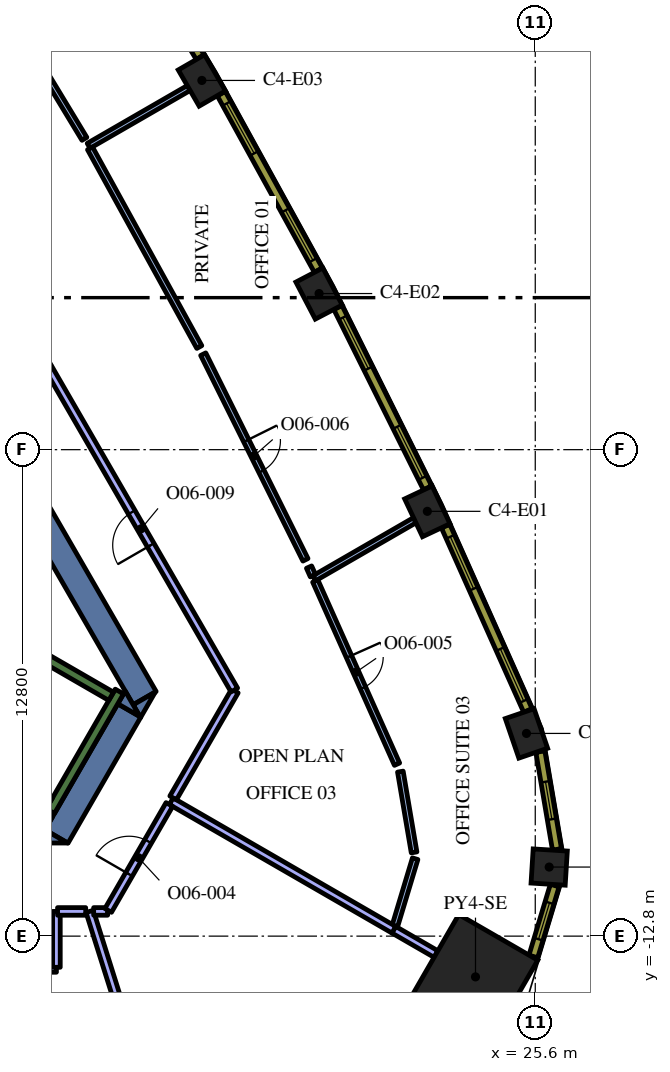
"""IFC4 building model, lengths in metres.
Left out: names, types, materials, properties, quantities, classifications, styles, units other than length and angle.
Written with IfcOpenShell. Run it as: python <this file> out.ifc"""

import sys

from ifc_helpers import new_model, si_unit, direction, frame, frame_2d, origin, origin_2d, place, context, subcontext, project, spatial, polyline, rectangle, outline, extrude, element, fill, save


model = new_model("IFC4")
c1 = context("Model", 3, precision=1e-05, world=origin(), true_north=direction((0.0, 1.0)))
c2 = subcontext(c1, "Body", "Model", "MODEL_VIEW")
j1 = project(units=[si_unit("LENGTHUNIT", "METRE"), si_unit("PLANEANGLEUNIT", "RADIAN")], contexts=[c1])
p1 = place(None, origin())
s1 = spatial("IfcSite", under=j1, at=p1, CompositionType="ELEMENT")
p2 = place(p1, origin())
s2 = spatial("IfcBuilding", under=s1, at=p2, CompositionType="ELEMENT")
p3 = place(p2, frame((0.0, 0.0, 205.8)))
s3 = spatial("IfcBuildingStorey", under=s2, at=p3, CompositionType="ELEMENT", Elevation=205.8)
p4 = place(p3, frame((24.027, -13.872, 0.0), z_axis=(0.0, 0.0, 1.0), x_axis=(0.866025403784, -0.5, 0.0)))
e1 = element("IfcColumn", 1, at=p4, inside=s3, PredefinedType="COLUMN", context=c2, shape_type="SweptSolid", body=[
    extrude(rectangle(XDim=2.4, YDim=2.4, at=origin_2d()), origin(), (0.0, 0.0, 1.0), 4.2),
])
p5 = place(p3, frame((25.967, -10.982, 0.0), z_axis=(0.0, 0.0, 1.0), x_axis=(0.062217428964, 0.998062619044, 0.0)))
e2 = element("IfcColumn", 2, at=p5, inside=s3, PredefinedType="COLUMN", context=c2, shape_type="SweptSolid", body=[
    extrude(rectangle(XDim=0.9, YDim=0.9, at=origin_2d()), origin(), (0.0, 0.0, 1.0), 4.2),
])
for number, where, z_axis, x_axis in (
    (3, (25.369, -7.466, 0.0), (0.0, 0.0, 1.0), (-0.324, 0.946, 0.0)),
    (4, (22.76, -1.623, 0.0), (0.0, 0.0, 1.0), (-0.426, 0.905, 0.0)),
    (5, (19.912, 4.108, 0.0), (0.0, 0.0, 1.0), (-0.464, 0.886, 0.0)),
    (6, (16.827, 9.715, 0.0), (0.0, 0.0, 1.0), (-0.5, 0.866, 0.0)),
):
    element("IfcColumn", number, at=place(p3, frame(where, z_axis=z_axis, x_axis=x_axis)), inside=s3, PredefinedType="COLUMN", context=c2, shape_type="SweptSolid", body=[
        extrude(rectangle(XDim=1.1, YDim=0.8, at=origin_2d()), origin(), (0.0, 0.0, 1.0), 4.2),
    ])
p6 = place(p3, frame((9.085, 4.264, 0.0), z_axis=(0.0, 0.0, 1.0), x_axis=(0.499998082512, -0.866026510844, 0.0)))
e7 = element("IfcWall", 7, at=p6, inside=s3, PredefinedType="SOLIDWALL", context=c2, shape_type="SweptSolid", body=[
    extrude(rectangle(XDim=12.472, YDim=0.7, at=frame_2d((6.236, 0.0))), origin(), (0.0, 0.0, 1.0), 4.2),
])
p7 = place(p3, origin())
e8 = element("IfcWall", 8, at=p7, inside=s3, PredefinedType="SOLIDWALL", context=c2, shape_type="SweptSolid", body=[
    extrude(outline(polyline([(15.213, -7.05), (15.019, -6.714), (15.601, -6.378), (15.213, -7.05)])), origin(), (0.0, 0.0, 1.0), 4.2),
])
p8 = place(p3, frame((13.003, -10.179, 0.0), z_axis=(0.0, 0.0, 1.0), x_axis=(0.499972675833, 0.866041178825, 0.0)))
e9 = element("IfcWall", 9, at=p8, inside=s3, PredefinedType="SOLIDWALL", context=c2, shape_type="SweptSolid", body=[
    extrude(rectangle(XDim=3.829, YDim=0.7, at=frame_2d((1.915, 0.0))), origin(), (0.0, 0.0, 1.0), 4.2),
])
e10 = element("IfcWall", 10, at=p7, inside=s3, PredefinedType="SOLIDWALL", context=c2, shape_type="SweptSolid", body=[
    extrude(outline(polyline([(12.698, -10.005), (13.296, -10.35), (12.5, -10.35), (12.698, -10.005)])), origin(), (0.0, 0.0, 1.0), 4.2),
])
e11 = element("IfcWall", 11, at=p7, inside=s3, PredefinedType="SOLIDWALL", context=c2, shape_type="SweptSolid", body=[
    extrude(outline(polyline([(14.809, -6.35), (15.197, -7.022), (14.615, -6.686), (14.809, -6.35)])), origin(), (0.0, 0.0, 1.0), 4.2),
])
e12 = element("IfcWall", 12, at=p7, inside=s3, PredefinedType="SOLIDWALL", context=c2, shape_type="SweptSolid", body=[
    extrude(outline(polyline([(12.904, -9.65), (12.516, -10.322), (12.516, -9.65), (12.904, -9.65)])), origin(), (0.0, 0.0, 1.0), 4.2),
])
p9 = place(p3, frame((12.84, -9.511, 0.0), z_axis=(0.0, 0.0, 1.0), x_axis=(0.500048121057, 0.865997619297, 0.0)))
e13 = element("IfcWall", 13, at=p9, inside=s3, PredefinedType="SOLIDWALL", context=c2, shape_type="SweptSolid", body=[
    extrude(rectangle(XDim=3.634, YDim=0.25, at=frame_2d((1.817, 0.0))), origin(), (0.0, 0.0, 1.0), 4.2),
])
p10 = place(p3, frame((12.84, -9.261, 0.0), z_axis=(0.0, 0.0, 1.0), x_axis=(-0.866013990052, 0.500019768644, 0.0)))
e14 = element("IfcWall", 14, at=p10, inside=s3, PredefinedType="SOLIDWALL", context=c2, shape_type="SweptSolid", body=[
    extrude(rectangle(XDim=6.8, YDim=0.25, at=frame_2d((3.4, 0.0))), origin(), (0.0, 0.0, 1.0), 4.2),
])
p11 = place(p3, frame((8.334, -2.964, 0.0), z_axis=(0.0, 0.0, 1.0), x_axis=(0.866016039709, -0.500016218704, 0.0)))
e15 = element("IfcWall", 15, at=p11, inside=s3, PredefinedType="SOLIDWALL", context=c2, shape_type="SweptSolid", body=[
    extrude(rectangle(XDim=7.05, YDim=0.25, at=frame_2d((3.525, 0.0))), origin(), (0.0, 0.0, 1.0), 4.2),
])
p12 = place(p3, frame((13.875, -12.15, 0.0), z_axis=(0.0, 0.0, 1.0), x_axis=(0.3005606746, -0.953762696316, 0.0)))
e16 = element("IfcWall", 16, at=p12, inside=s3, PredefinedType="PARTITIONING", context=c2, shape_type="SweptSolid", body=[
    extrude(rectangle(XDim=6.9, YDim=0.2, at=frame_2d((3.45, 0.0))), origin(), (0.0, 0.0, 1.0), 3.45),
])
p13 = place(p3, frame((6.517, -13.65, 0.0), z_axis=(0.0, 0.0, 1.0), x_axis=(1.0, 0.0, 0.0)))
e17 = element("IfcWall", 17, at=p13, inside=s3, PredefinedType="PARTITIONING", context=c2, shape_type="SweptSolid", body=[
    extrude(rectangle(XDim=6.483, YDim=0.2, at=frame_2d((3.242, 0.0))), origin(), (0.0, 0.0, 1.0), 3.45),
])
p14 = place(p13, frame((2.7, 0.0, 0.0)))
e18 = element("IfcOpeningElement", 18, at=p14, cuts=e17, PredefinedType="OPENING", context=c2, shape_type="SweptSolid", body=[
    extrude(rectangle(XDim=1.0, YDim=2.1, at=frame_2d((0.5, 1.05))), frame((0.0, 0.11, 0.0), z_axis=(0.0, -1.0, 0.0), x_axis=(1.0, 0.0, 0.0)), (0.0, 0.0, 1.0), 0.22),
])
p15 = place(p3, frame((13.0, -13.62, 0.0), z_axis=(0.0, 0.0, 1.0), x_axis=(0.0, 1.0, 0.0)))
e19 = element("IfcWall", 19, at=p15, inside=s3, PredefinedType="PARTITIONING", context=c2, shape_type="SweptSolid", body=[
    extrude(rectangle(XDim=1.47, YDim=0.2, at=frame_2d((0.735, 0.0))), origin(), (0.0, 0.0, 1.0), 3.45),
])
p16 = place(p3, frame((13.03, -12.15, 0.0), z_axis=(0.0, 0.0, 1.0), x_axis=(1.0, 0.0, 0.0)))
e20 = element("IfcWall", 20, at=p16, inside=s3, PredefinedType="PARTITIONING", context=c2, shape_type="SweptSolid", body=[
    extrude(rectangle(XDim=0.74, YDim=0.2, at=frame_2d((0.37, 0.0))), origin(), (0.0, 0.0, 1.0), 3.45),
])
p17 = place(p3, frame((21.873, -12.628, 0.0), z_axis=(0.0, 0.0, 1.0), x_axis=(0.866052988967, -0.499952218018, 0.0)))
e21 = element("IfcWall", 21, at=p17, inside=s3, PredefinedType="PARTITIONING", context=c2, shape_type="SweptSolid", body=[
    extrude(rectangle(XDim=1.288, YDim=0.2, at=frame_2d((0.644, 0.0))), origin(), (0.0, 0.0, 1.0), 3.45),
])
p18 = place(p3, frame((16.021, -9.25, 0.0), z_axis=(0.0, 0.0, 1.0), x_axis=(0.86602692059, -0.499997372806, 0.0)))
e22 = element("IfcWall", 22, at=p18, inside=s3, PredefinedType="PARTITIONING", context=c2, shape_type="SweptSolid", body=[
    extrude(rectangle(XDim=6.765, YDim=0.2, at=frame_2d((3.382, 0.0))), origin(), (0.0, 0.0, 1.0), 3.45),
])
p19 = place(p3, frame((13.98, -12.15, 0.0), z_axis=(0.0, 0.0, 1.0), x_axis=(1.0, 0.0, 0.0)))
e23 = element("IfcWall", 23, at=p19, inside=s3, PredefinedType="PARTITIONING", context=c2, shape_type="SweptSolid", body=[
    extrude(rectangle(XDim=0.367, YDim=0.2, at=frame_2d((0.184, 0.0))), origin(), (0.0, 0.0, 1.0), 3.45),
])
p20 = place(p3, frame((14.362, -12.124, 0.0), z_axis=(0.0, 0.0, 1.0), x_axis=(0.500022299258, 0.866012528919, 0.0)))
e24 = element("IfcWall", 24, at=p20, inside=s3, PredefinedType="PARTITIONING", context=c2, shape_type="SweptSolid", body=[
    extrude(rectangle(XDim=3.219, YDim=0.2, at=frame_2d((1.609, 0.0))), origin(), (0.0, 0.0, 1.0), 3.45),
])
p21 = place(p20, frame((1.1, 0.0, 0.0)))
e25 = element("IfcOpeningElement", 25, at=p21, cuts=e24, PredefinedType="OPENING", context=c2, shape_type="SweptSolid", body=[
    extrude(rectangle(XDim=1.0, YDim=2.1, at=frame_2d((0.5, 1.05))), frame((0.0, 0.11, 0.0), z_axis=(0.0, -1.0, 0.0), x_axis=(1.0, 0.0, 0.0)), (0.0, 0.0, 1.0), 0.22),
])
p22 = place(p3, frame((19.78, -3.386, 0.0), z_axis=(0.0, 0.0, 1.0), x_axis=(0.866063280451, 0.49993438995, 0.0)))
e26 = element("IfcWall", 26, at=p22, inside=s3, PredefinedType="PARTITIONING", context=c2, shape_type="SweptSolid", body=[
    extrude(rectangle(XDim=3.058, YDim=0.15, at=frame_2d((1.529, 0.0))), origin(), (0.0, 0.0, 1.0), 3.45),
])
p23 = place(p3, frame((21.906, -12.532, 0.0), z_axis=(0.0, 0.0, 1.0), x_axis=(0.288789848591, 0.957392512688, 0.0)))
e27 = element("IfcWall", 27, at=p23, inside=s3, PredefinedType="PARTITIONING", context=c2, shape_type="SweptSolid", body=[
    extrude(rectangle(XDim=1.848, YDim=0.15, at=frame_2d((0.924, 0.0))), origin(), (0.0, 0.0, 1.0), 3.45),
])
p24 = place(p3, frame((22.412, -10.597, 0.0), z_axis=(0.0, 0.0, 1.0), x_axis=(-0.167612004459, 0.985853039738, 0.0)))
e28 = element("IfcWall", 28, at=p24, inside=s3, PredefinedType="PARTITIONING", context=c2, shape_type="SweptSolid", body=[
    extrude(rectangle(XDim=2.156, YDim=0.15, at=frame_2d((1.078, 0.0))), origin(), (0.0, 0.0, 1.0), 3.45),
])
p25 = place(p3, frame((19.811, -3.455, 0.0), z_axis=(0.0, 0.0, 1.0), x_axis=(0.407605393886, -0.913158169692, 0.0)))
e29 = element("IfcWall", 29, at=p25, inside=s3, PredefinedType="PARTITIONING", context=c2, shape_type="SweptSolid", body=[
    extrude(rectangle(XDim=5.279, YDim=0.15, at=frame_2d((2.64, 0.0))), origin(), (0.0, 0.0, 1.0), 3.45),
])
p26 = place(p25, frame((2.179, 0.0, 0.0)))
e30 = element("IfcOpeningElement", 30, at=p26, cuts=e29, PredefinedType="OPENING", context=c2, shape_type="SweptSolid", body=[
    extrude(rectangle(XDim=0.9, YDim=2.1, at=frame_2d((0.45, 1.05))), frame((0.0, 0.085, 0.0), z_axis=(0.0, -1.0, 0.0), x_axis=(1.0, 0.0, 0.0)), (0.0, 0.0, 1.0), 0.17),
])
p27 = place(p3, frame((13.848, 7.995, 0.0), z_axis=(0.0, 0.0, 1.0), x_axis=(0.86603583403, 0.49998193385, 0.0)))
e31 = element("IfcWall", 31, at=p27, inside=s3, PredefinedType="PARTITIONING", context=c2, shape_type="SweptSolid", body=[
    extrude(rectangle(XDim=3.041, YDim=0.15, at=frame_2d((1.52, 0.0))), origin(), (0.0, 0.0, 1.0), 3.45),
])
p28 = place(p3, frame((19.75, -3.317, 0.0), z_axis=(0.0, 0.0, 1.0), x_axis=(-0.406774979688, 0.913528388119, 0.0)))
e32 = element("IfcWall", 32, at=p28, inside=s3, PredefinedType="PARTITIONING", context=c2, shape_type="SweptSolid", body=[
    extrude(rectangle(XDim=0.249, YDim=0.15, at=frame_2d((0.125, 0.0))), origin(), (0.0, 0.0, 1.0), 3.45),
])
p29 = place(p3, frame((16.863, 2.513, 0.0), z_axis=(0.0, 0.0, 1.0), x_axis=(0.445159947046, -0.895451071553, 0.0)))
e33 = element("IfcWall", 33, at=p29, inside=s3, PredefinedType="PARTITIONING", context=c2, shape_type="SweptSolid", body=[
    extrude(rectangle(XDim=6.043, YDim=0.15, at=frame_2d((3.021, 0.0))), origin(), (0.0, 0.0, 1.0), 3.45),
])
p30 = place(p29, frame((2.542, 0.0, 0.0)))
e34 = element("IfcOpeningElement", 34, at=p30, cuts=e33, PredefinedType="OPENING", context=c2, shape_type="SweptSolid", body=[
    extrude(rectangle(XDim=0.9, YDim=2.1, at=frame_2d((0.45, 1.05))), frame((0.0, 0.085, 0.0), z_axis=(0.0, -1.0, 0.0), x_axis=(1.0, 0.0, 0.0)), (0.0, 0.0, 1.0), 0.17),
])
p31 = place(p3, frame((16.76, 2.7, 0.0), z_axis=(0.0, 0.0, 1.0), x_axis=(-0.481907755985, 0.876221955169, 0.0)))
e35 = element("IfcWall", 35, at=p31, inside=s3, PredefinedType="PARTITIONING", context=c2, shape_type="SweptSolid", body=[
    extrude(rectangle(XDim=5.967, YDim=0.15, at=frame_2d((2.984, 0.0))), origin(), (0.0, 0.0, 1.0), 3.45),
])
p32 = place(p3, frame((13.737, 8.178, 0.0), z_axis=(0.0, 0.0, 1.0), x_axis=(-0.517884383874, 0.855450620983, 0.0)))
e36 = element("IfcWall", 36, at=p32, inside=s3, PredefinedType="PARTITIONING", context=c2, shape_type="SweptSolid", body=[
    extrude(rectangle(XDim=6.043, YDim=0.15, at=frame_2d((3.021, 0.0))), origin(), (0.0, 0.0, 1.0), 3.45),
])
p33 = place(p3, frame((16.072, -9.163, 0.0), z_axis=(0.0, 0.0, 1.0), x_axis=(0.500010870188, 0.866019127788, 0.0)))
e37 = element("IfcWall", 37, at=p33, inside=s3, PredefinedType="PARTITIONING", context=c2, shape_type="SweptSolid", body=[
    extrude(rectangle(XDim=3.249, YDim=0.2, at=frame_2d((1.624, 0.0))), origin(), (0.0, 0.0, 1.0), 3.45),
])
p34 = place(p3, frame((17.681, -6.324, 0.0), z_axis=(0.0, 0.0, 1.0), x_axis=(-0.500021153861, 0.866013190252, 0.0)))
e38 = element("IfcWall", 38, at=p34, inside=s3, PredefinedType="PARTITIONING", context=c2, shape_type="SweptSolid", body=[
    extrude(rectangle(XDim=9.787, YDim=0.2, at=frame_2d((4.894, 0.0))), origin(), (0.0, 0.0, 1.0), 3.45),
])
p35 = place(p34, frame((4.4, 0.0, 0.0)))
e39 = element("IfcOpeningElement", 39, at=p35, cuts=e38, PredefinedType="OPENING", context=c2, shape_type="SweptSolid", body=[
    extrude(rectangle(XDim=1.0, YDim=2.1, at=frame_2d((0.5, 1.05))), frame((0.0, 0.11, 0.0), z_axis=(0.0, -1.0, 0.0), x_axis=(1.0, 0.0, 0.0)), (0.0, 0.0, 1.0), 0.22),
])
p36 = place(p3, frame((25.55, -13.335, 0.0), z_axis=(0.0, 0.0, 1.0), x_axis=(0.288727209095, 0.957411405159, 0.0)))
e40 = element("IfcWall", 40, at=p36, inside=s3, PredefinedType="SOLIDWALL", context=c2, shape_type="SweptSolid", body=[
    extrude(rectangle(XDim=1.948, YDim=0.24, at=frame_2d((0.974, 0.0))), origin(), (0.0, 0.0, 1.0), 3.95),
])
p37 = place(p36, frame((0.474, 0.0, 0.9)))
e41 = element("IfcOpeningElement", 41, at=p37, cuts=e40, PredefinedType="OPENING", context=c2, shape_type="SweptSolid", body=[
    extrude(rectangle(XDim=1.0, YDim=2.55, at=frame_2d((0.5, 1.275))), frame((0.0, 0.13, 0.0), z_axis=(0.0, -1.0, 0.0), x_axis=(1.0, 0.0, 0.0)), (0.0, 0.0, 1.0), 0.26),
])
p38 = place(p3, frame((26.172, -10.517, 0.0), z_axis=(0.0, 0.0, 1.0), x_axis=(-0.167660055546, 0.985844869021, 0.0)))
e42 = element("IfcWall", 42, at=p38, inside=s3, PredefinedType="SOLIDWALL", context=c2, shape_type="SweptSolid", body=[
    extrude(rectangle(XDim=2.609, YDim=0.24, at=frame_2d((1.305, 0.0))), origin(), (0.0, 0.0, 1.0), 3.95),
])
p39 = place(p38, frame((0.805, 0.0, 0.9)))
e43 = element("IfcOpeningElement", 43, at=p39, cuts=e42, PredefinedType="OPENING", context=c2, shape_type="SweptSolid", body=[
    extrude(rectangle(XDim=1.0, YDim=2.55, at=frame_2d((0.5, 1.275))), frame((0.0, 0.13, 0.0), z_axis=(0.0, -1.0, 0.0), x_axis=(1.0, 0.0, 0.0)), (0.0, 0.0, 1.0), 0.26),
])
p40 = place(p3, frame((25.405, -6.861, 0.0), z_axis=(0.0, 0.0, 1.0), x_axis=(-0.407579651789, 0.913169659728, 0.0)))
e44 = element("IfcWall", 44, at=p40, inside=s3, PredefinedType="SOLIDWALL", context=c2, shape_type="SweptSolid", body=[
    extrude(rectangle(XDim=5.311, YDim=0.24, at=frame_2d((2.655, 0.0))), origin(), (0.0, 0.0, 1.0), 3.95),
])
p41 = place(p40, frame((0.271, 0.0, 0.9)))
e45 = element("IfcOpeningElement", 45, at=p41, cuts=e44, PredefinedType="OPENING", context=c2, shape_type="SweptSolid", body=[
    extrude(rectangle(XDim=1.5, YDim=2.55, at=frame_2d((0.75, 1.275))), frame((0.0, 0.13, 0.0), z_axis=(0.0, -1.0, 0.0), x_axis=(1.0, 0.0, 0.0)), (0.0, 0.0, 1.0), 0.26),
])
p42 = place(p40, frame((3.504, 0.0, 0.9)))
e46 = element("IfcOpeningElement", 46, at=p42, cuts=e44, PredefinedType="OPENING", context=c2, shape_type="SweptSolid", body=[
    extrude(rectangle(XDim=1.5, YDim=2.55, at=frame_2d((0.75, 1.275))), frame((0.0, 0.13, 0.0), z_axis=(0.0, -1.0, 0.0), x_axis=(1.0, 0.0, 0.0)), (0.0, 0.0, 1.0), 0.26),
])
p43 = place(p3, frame((22.766, -1.005, 0.0), z_axis=(0.0, 0.0, 1.0), x_axis=(-0.445129582031, 0.895466166419, 0.0)))
e47 = element("IfcWall", 47, at=p43, inside=s3, PredefinedType="SOLIDWALL", context=c2, shape_type="SweptSolid", body=[
    extrude(rectangle(XDim=5.298, YDim=0.24, at=frame_2d((2.649, 0.0))), origin(), (0.0, 0.0, 1.0), 3.95),
])
p44 = place(p43, frame((0.295, 0.0, 0.9)))
e48 = element("IfcOpeningElement", 48, at=p44, cuts=e47, PredefinedType="OPENING", context=c2, shape_type="SweptSolid", body=[
    extrude(rectangle(XDim=1.5, YDim=2.55, at=frame_2d((0.75, 1.275))), frame((0.0, 0.13, 0.0), z_axis=(0.0, -1.0, 0.0), x_axis=(1.0, 0.0, 0.0)), (0.0, 0.0, 1.0), 0.26),
])
p45 = place(p43, frame((3.504, 0.0, 0.9)))
e49 = element("IfcOpeningElement", 49, at=p45, cuts=e47, PredefinedType="OPENING", context=c2, shape_type="SweptSolid", body=[
    extrude(rectangle(XDim=1.5, YDim=2.55, at=frame_2d((0.75, 1.275))), frame((0.0, 0.13, 0.0), z_axis=(0.0, -1.0, 0.0), x_axis=(1.0, 0.0, 0.0)), (0.0, 0.0, 1.0), 0.26),
])
p46 = place(p3, frame((19.892, 4.725, 0.0), z_axis=(0.0, 0.0, 1.0), x_axis=(-0.481925825015, 0.876212017256, 0.0)))
e50 = element("IfcWall", 50, at=p46, inside=s3, PredefinedType="SOLIDWALL", context=c2, shape_type="SweptSolid", body=[
    extrude(rectangle(XDim=5.299, YDim=0.24, at=frame_2d((2.649, 0.0))), origin(), (0.0, 0.0, 1.0), 3.95),
])
p47 = place(p46, frame((0.295, 0.0, 0.9)))
e51 = element("IfcOpeningElement", 51, at=p47, cuts=e50, PredefinedType="OPENING", context=c2, shape_type="SweptSolid", body=[
    extrude(rectangle(XDim=1.5, YDim=2.55, at=frame_2d((0.75, 1.275))), frame((0.0, 0.13, 0.0), z_axis=(0.0, -1.0, 0.0), x_axis=(1.0, 0.0, 0.0)), (0.0, 0.0, 1.0), 0.26),
])
p48 = place(p46, frame((3.504, 0.0, 0.9)))
e52 = element("IfcOpeningElement", 52, at=p48, cuts=e50, PredefinedType="OPENING", context=c2, shape_type="SweptSolid", body=[
    extrude(rectangle(XDim=1.5, YDim=2.55, at=frame_2d((0.75, 1.275))), frame((0.0, 0.13, 0.0), z_axis=(0.0, -1.0, 0.0), x_axis=(1.0, 0.0, 0.0)), (0.0, 0.0, 1.0), 0.26),
])
p49 = place(p3, frame((16.782, 10.331, 0.0), z_axis=(0.0, 0.0, 1.0), x_axis=(-0.517846166225, 0.855473756538, 0.0)))
e53 = element("IfcWall", 53, at=p49, inside=s3, PredefinedType="SOLIDWALL", context=c2, shape_type="SweptSolid", body=[
    extrude(rectangle(XDim=5.298, YDim=0.24, at=frame_2d((2.649, 0.0))), origin(), (0.0, 0.0, 1.0), 3.95),
])
p50 = place(p49, frame((0.294, 0.0, 0.9)))
e54 = element("IfcOpeningElement", 54, at=p50, cuts=e53, PredefinedType="OPENING", context=c2, shape_type="SweptSolid", body=[
    extrude(rectangle(XDim=1.5, YDim=2.55, at=frame_2d((0.75, 1.275))), frame((0.0, 0.13, 0.0), z_axis=(0.0, -1.0, 0.0), x_axis=(1.0, 0.0, 0.0)), (0.0, 0.0, 1.0), 0.26),
])
p51 = place(p49, frame((3.504, 0.0, 0.9)))
e55 = element("IfcOpeningElement", 55, at=p51, cuts=e53, PredefinedType="OPENING", context=c2, shape_type="SweptSolid", body=[
    extrude(rectangle(XDim=1.5, YDim=2.55, at=frame_2d((0.75, 1.275))), frame((0.0, 0.13, 0.0), z_axis=(0.0, -1.0, 0.0), x_axis=(1.0, 0.0, 0.0)), (0.0, 0.0, 1.0), 0.26),
])
p52 = place(p21, origin())
e56 = element("IfcDoor", 56, at=p52, inside=s3, OperationType="SINGLE_SWING_LEFT", PredefinedType="DOOR", context=c2, shape_type="SweptSolid", body=[
    extrude(rectangle(XDim=1.0, YDim=2.1, at=frame_2d((0.5, 1.05))), frame((0.0, 0.025, 0.0), z_axis=(0.0, -1.0, 0.0), x_axis=(1.0, 0.0, 0.0)), (0.0, 0.0, 1.0), 0.05),
])
fill(e25, e56)
p53 = place(p26, origin())
e57 = element("IfcDoor", 57, at=p53, inside=s3, OperationType="SINGLE_SWING_LEFT", PredefinedType="DOOR", context=c2, shape_type="SweptSolid", body=[
    extrude(rectangle(XDim=0.9, YDim=2.1, at=frame_2d((0.45, 1.05))), frame((0.0, 0.025, 0.0), z_axis=(0.0, -1.0, 0.0), x_axis=(1.0, 0.0, 0.0)), (0.0, 0.0, 1.0), 0.05),
])
fill(e30, e57)
p54 = place(p30, origin())
e58 = element("IfcDoor", 58, at=p54, inside=s3, OperationType="SINGLE_SWING_LEFT", PredefinedType="DOOR", context=c2, shape_type="SweptSolid", body=[
    extrude(rectangle(XDim=0.9, YDim=2.1, at=frame_2d((0.45, 1.05))), frame((0.0, 0.025, 0.0), z_axis=(0.0, -1.0, 0.0), x_axis=(1.0, 0.0, 0.0)), (0.0, 0.0, 1.0), 0.05),
])
fill(e34, e58)
p55 = place(p35, origin())
e59 = element("IfcDoor", 59, at=p55, inside=s3, OperationType="SINGLE_SWING_RIGHT", PredefinedType="DOOR", context=c2, shape_type="SweptSolid", body=[
    extrude(rectangle(XDim=1.0, YDim=2.1, at=frame_2d((0.5, 1.05))), frame((0.0, 0.025, 0.0), z_axis=(0.0, -1.0, 0.0), x_axis=(1.0, 0.0, 0.0)), (0.0, 0.0, 1.0), 0.05),
])
fill(e39, e59)
p56 = place(p37, origin())
e60 = element("IfcWindow", 60, at=p56, inside=s3, PartitioningType="SINGLE_PANEL", PredefinedType="WINDOW", context=c2, shape_type="SweptSolid", body=[
    extrude(rectangle(XDim=1.0, YDim=2.55, at=frame_2d((0.5, 1.275))), frame((0.0, 0.04, 0.0), z_axis=(0.0, -1.0, 0.0), x_axis=(1.0, 0.0, 0.0)), (0.0, 0.0, 1.0), 0.06),
])
fill(e41, e60)
p57 = place(p39, origin())
e61 = element("IfcWindow", 61, at=p57, inside=s3, PartitioningType="SINGLE_PANEL", PredefinedType="WINDOW", context=c2, shape_type="SweptSolid", body=[
    extrude(rectangle(XDim=1.0, YDim=2.55, at=frame_2d((0.5, 1.275))), frame((0.0, 0.04, 0.0), z_axis=(0.0, -1.0, 0.0), x_axis=(1.0, 0.0, 0.0)), (0.0, 0.0, 1.0), 0.06),
])
fill(e43, e61)
p58 = place(p41, origin())
e62 = element("IfcWindow", 62, at=p58, inside=s3, PartitioningType="SINGLE_PANEL", PredefinedType="WINDOW", context=c2, shape_type="SweptSolid", body=[
    extrude(rectangle(XDim=1.5, YDim=2.55, at=frame_2d((0.75, 1.275))), frame((0.0, 0.04, 0.0), z_axis=(0.0, -1.0, 0.0), x_axis=(1.0, 0.0, 0.0)), (0.0, 0.0, 1.0), 0.06),
])
fill(e45, e62)
p59 = place(p42, origin())
e63 = element("IfcWindow", 63, at=p59, inside=s3, PartitioningType="SINGLE_PANEL", PredefinedType="WINDOW", context=c2, shape_type="SweptSolid", body=[
    extrude(rectangle(XDim=1.5, YDim=2.55, at=frame_2d((0.75, 1.275))), frame((0.0, 0.04, 0.0), z_axis=(0.0, -1.0, 0.0), x_axis=(1.0, 0.0, 0.0)), (0.0, 0.0, 1.0), 0.06),
])
fill(e46, e63)
p60 = place(p44, origin())
e64 = element("IfcWindow", 64, at=p60, inside=s3, PartitioningType="SINGLE_PANEL", PredefinedType="WINDOW", context=c2, shape_type="SweptSolid", body=[
    extrude(rectangle(XDim=1.5, YDim=2.55, at=frame_2d((0.75, 1.275))), frame((0.0, 0.04, 0.0), z_axis=(0.0, -1.0, 0.0), x_axis=(1.0, 0.0, 0.0)), (0.0, 0.0, 1.0), 0.06),
])
fill(e48, e64)
p61 = place(p45, origin())
e65 = element("IfcWindow", 65, at=p61, inside=s3, PartitioningType="SINGLE_PANEL", PredefinedType="WINDOW", context=c2, shape_type="SweptSolid", body=[
    extrude(rectangle(XDim=1.5, YDim=2.55, at=frame_2d((0.75, 1.275))), frame((0.0, 0.04, 0.0), z_axis=(0.0, -1.0, 0.0), x_axis=(1.0, 0.0, 0.0)), (0.0, 0.0, 1.0), 0.06),
])
fill(e49, e65)
p62 = place(p47, origin())
e66 = element("IfcWindow", 66, at=p62, inside=s3, PartitioningType="SINGLE_PANEL", PredefinedType="WINDOW", context=c2, shape_type="SweptSolid", body=[
    extrude(rectangle(XDim=1.5, YDim=2.55, at=frame_2d((0.75, 1.275))), frame((0.0, 0.04, 0.0), z_axis=(0.0, -1.0, 0.0), x_axis=(1.0, 0.0, 0.0)), (0.0, 0.0, 1.0), 0.06),
])
fill(e51, e66)
p63 = place(p48, origin())
e67 = element("IfcWindow", 67, at=p63, inside=s3, PartitioningType="SINGLE_PANEL", PredefinedType="WINDOW", context=c2, shape_type="SweptSolid", body=[
    extrude(rectangle(XDim=1.5, YDim=2.55, at=frame_2d((0.75, 1.275))), frame((0.0, 0.04, 0.0), z_axis=(0.0, -1.0, 0.0), x_axis=(1.0, 0.0, 0.0)), (0.0, 0.0, 1.0), 0.06),
])
fill(e52, e67)
save(model, sys.argv[1])
